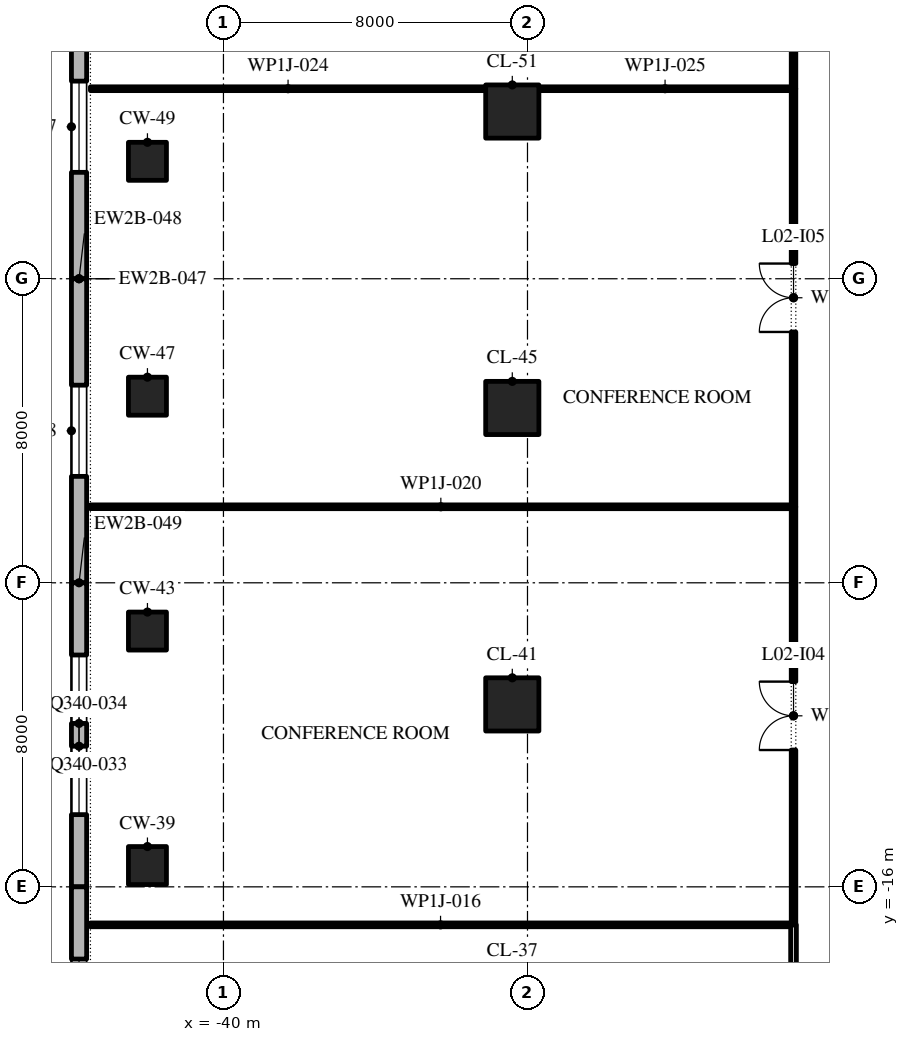
"""IFC4 building model, lengths in metres.
Left out: names, types, materials, properties, quantities, classifications, styles, units other than length and angle.
Written with IfcOpenShell. Run it as: python <this file> out.ifc"""

import sys

from ifc_helpers import new_model, si_unit, direction, frame, frame_2d, origin, origin_2d, place, context, subcontext, project, spatial, polyline, rectangle, outline, extrude, element, fill, save


model = new_model("IFC4")
c1 = context("Model", 3, precision=1e-05, world=origin(), true_north=direction((0.0, 1.0)))
c2 = subcontext(c1, "Body", "Model", "MODEL_VIEW")
j1 = project(units=[si_unit("LENGTHUNIT", "METRE"), si_unit("PLANEANGLEUNIT", "RADIAN")], contexts=[c1])
p1 = place(None, origin())
s1 = spatial("IfcSite", under=j1, at=p1, CompositionType="ELEMENT")
p2 = place(p1, origin())
s2 = spatial("IfcBuilding", under=s1, at=p2, CompositionType="ELEMENT")
p3 = place(p2, frame((0.0, 0.0, 14.0)))
s3 = spatial("IfcBuildingStorey", under=s2, at=p3, CompositionType="ELEMENT", Elevation=14.0)
p4 = place(p3, frame((-42.0, -15.44, 0.0), z_axis=(0.0, 0.0, 1.0), x_axis=(1.0, 0.0, 0.0)))
e1 = element("IfcColumn", 1, at=p4, inside=s3, PredefinedType="COLUMN", context=c2, shape_type="SweptSolid", body=[
    extrude(rectangle(XDim=1.0, YDim=1.0, at=origin_2d()), origin(), (0.0, 0.0, 1.0), 5.2),
])
p5 = place(p3, frame((-32.4, -11.2, 0.0), z_axis=(0.0, 0.0, 1.0), x_axis=(1.0, 0.0, 0.0)))
e2 = element("IfcColumn", 2, at=p5, inside=s3, PredefinedType="COLUMN", context=c2, shape_type="SweptSolid", body=[
    extrude(rectangle(XDim=1.4, YDim=1.4, at=origin_2d()), origin(), (0.0, 0.0, 1.0), 5.2),
])
p6 = place(p3, frame((-42.0, -9.27, 0.0), z_axis=(0.0, 0.0, 1.0), x_axis=(1.0, 0.0, 0.0)))
e3 = element("IfcColumn", 3, at=p6, inside=s3, PredefinedType="COLUMN", context=c2, shape_type="SweptSolid", body=[
    extrude(rectangle(XDim=1.0, YDim=1.0, at=origin_2d()), origin(), (0.0, 0.0, 1.0), 5.2),
])
p7 = place(p3, frame((-32.4, -3.4, 0.0), z_axis=(0.0, 0.0, 1.0), x_axis=(1.0, 0.0, 0.0)))
e4 = element("IfcColumn", 4, at=p7, inside=s3, PredefinedType="COLUMN", context=c2, shape_type="SweptSolid", body=[
    extrude(rectangle(XDim=1.4, YDim=1.4, at=origin_2d()), origin(), (0.0, 0.0, 1.0), 5.2),
])
for number, where, z_axis, x_axis in (
    (5, (-42.0, -3.09, 0.0), (0.0, 0.0, 1.0), (1.0, 0.0, 0.0)),
    (6, (-42.0, 3.09, 0.0), (0.0, 0.0, 1.0), (1.0, 0.0, 0.0)),
):
    element("IfcColumn", number, at=place(p3, frame(where, z_axis=z_axis, x_axis=x_axis)), inside=s3, PredefinedType="COLUMN", context=c2, shape_type="SweptSolid", body=[
        extrude(rectangle(XDim=1.0, YDim=1.0, at=origin_2d()), origin(), (0.0, 0.0, 1.0), 5.2),
    ])
p8 = place(p3, frame((-32.4, 4.4, 0.0), z_axis=(0.0, 0.0, 1.0), x_axis=(1.0, 0.0, 0.0)))
e7 = element("IfcColumn", 7, at=p8, inside=s3, PredefinedType="COLUMN", context=c2, shape_type="SweptSolid", body=[
    extrude(rectangle(XDim=1.4, YDim=1.4, at=origin_2d()), origin(), (0.0, 0.0, 1.0), 5.2),
])
p9 = place(p3, frame((-43.8, 8.0, 0.0), z_axis=(0.0, 0.0, 1.0), x_axis=(0.0, -1.0, 0.0)))
e8 = element("IfcWall", 8, at=p9, inside=s3, PredefinedType="STANDARD", context=c2, shape_type="SweptSolid", body=[
    extrude(rectangle(XDim=8.0, YDim=0.4, at=frame_2d((4.0, 0.0))), origin(), (0.0, 0.0, 1.0), 4.9),
])
p10 = place(p9, frame((2.8, 0.0, 0.9)))
e9 = element("IfcOpeningElement", 9, at=p10, cuts=e8, PredefinedType="OPENING", context=c2, shape_type="SweptSolid", body=[
    extrude(outline(polyline([(0.0, 0.0), (2.4, 0.0), (2.4, 1.7), (2.379, 1.976), (2.315, 2.246), (2.212, 2.502), (2.07, 2.74), (1.893, 2.954), (1.686, 3.137), (1.453, 3.287), (1.2, 3.4), (0.947, 3.287), (0.714, 3.137), (0.507, 2.954), (0.33, 2.74), (0.188, 2.502), (0.084, 2.246), (0.021, 1.976), (0.0, 1.7), (0.0, 0.0)])), frame((0.0, 0.21, 0.0), z_axis=(0.0, -1.0, 0.0), x_axis=(1.0, 0.0, 0.0)), (0.0, 0.0, 1.0), 0.42),
])
p11 = place(p3, frame((-43.8, 0.0, 0.0), z_axis=(0.0, 0.0, 1.0), x_axis=(0.0, -1.0, 0.0)))
e10 = element("IfcWall", 10, at=p11, inside=s3, PredefinedType="STANDARD", context=c2, shape_type="SweptSolid", body=[
    extrude(rectangle(XDim=8.0, YDim=0.4, at=frame_2d((4.0, 0.0))), origin(), (0.0, 0.0, 1.0), 4.9),
])
p12 = place(p11, frame((2.8, 0.0, 0.9)))
e11 = element("IfcOpeningElement", 11, at=p12, cuts=e10, PredefinedType="OPENING", context=c2, shape_type="SweptSolid", body=[
    extrude(outline(polyline([(0.0, 0.0), (2.4, 0.0), (2.4, 1.7), (2.379, 1.976), (2.315, 2.246), (2.212, 2.502), (2.07, 2.74), (1.893, 2.954), (1.686, 3.137), (1.453, 3.287), (1.2, 3.4), (0.947, 3.287), (0.714, 3.137), (0.507, 2.954), (0.33, 2.74), (0.188, 2.502), (0.084, 2.246), (0.021, 1.976), (0.0, 1.7), (0.0, 0.0)])), frame((0.0, 0.21, 0.0), z_axis=(0.0, -1.0, 0.0), x_axis=(1.0, 0.0, 0.0)), (0.0, 0.0, 1.0), 0.42),
])
p13 = place(p3, frame((-43.8, -8.0, 0.0), z_axis=(0.0, 0.0, 1.0), x_axis=(0.0, -1.0, 0.0)))
e12 = element("IfcWall", 12, at=p13, inside=s3, PredefinedType="STANDARD", context=c2, shape_type="SweptSolid", body=[
    extrude(rectangle(XDim=8.0, YDim=0.4, at=frame_2d((4.0, 0.0))), origin(), (0.0, 0.0, 1.0), 4.9),
])
p14 = place(p13, frame((1.9, 0.0, 0.9)))
e13 = element("IfcOpeningElement", 13, at=p14, cuts=e12, PredefinedType="OPENING", context=c2, shape_type="SweptSolid", body=[
    extrude(outline(polyline([(0.0, 0.0), (1.8, 0.0), (1.8, 1.841), (1.785, 2.076), (1.739, 2.307), (1.663, 2.53), (1.559, 2.741), (1.428, 2.937), (1.273, 3.114), (1.096, 3.269), (0.9, 3.4), (0.704, 3.269), (0.527, 3.114), (0.372, 2.937), (0.241, 2.741), (0.137, 2.53), (0.061, 2.307), (0.015, 2.076), (0.0, 1.841), (0.0, 0.0)])), frame((0.0, 0.21, 0.0), z_axis=(0.0, -1.0, 0.0), x_axis=(1.0, 0.0, 0.0)), (0.0, 0.0, 1.0), 0.42),
])
p15 = place(p13, frame((4.3, 0.0, 0.9)))
e14 = element("IfcOpeningElement", 14, at=p15, cuts=e12, PredefinedType="OPENING", context=c2, shape_type="SweptSolid", body=[
    extrude(outline(polyline([(0.0, 0.0), (1.8, 0.0), (1.8, 1.841), (1.785, 2.076), (1.739, 2.307), (1.663, 2.53), (1.559, 2.741), (1.428, 2.937), (1.273, 3.114), (1.096, 3.269), (0.9, 3.4), (0.704, 3.269), (0.527, 3.114), (0.372, 2.937), (0.241, 2.741), (0.137, 2.53), (0.061, 2.307), (0.015, 2.076), (0.0, 1.841), (0.0, 0.0)])), frame((0.0, 0.21, 0.0), z_axis=(0.0, -1.0, 0.0), x_axis=(1.0, 0.0, 0.0)), (0.0, 0.0, 1.0), 0.42),
])
p16 = place(p3, frame((-43.8, -16.0, 0.0), z_axis=(0.0, 0.0, 1.0), x_axis=(0.0, -1.0, 0.0)))
e15 = element("IfcWall", 15, at=p16, inside=s3, PredefinedType="STANDARD", context=c2, shape_type="SweptSolid", body=[
    extrude(rectangle(XDim=8.0, YDim=0.4, at=frame_2d((4.0, 0.0))), origin(), (0.0, 0.0, 1.0), 4.9),
])
p17 = place(p16, frame((1.9, 0.0, 0.9)))
e16 = element("IfcOpeningElement", 16, at=p17, cuts=e15, PredefinedType="OPENING", context=c2, shape_type="SweptSolid", body=[
    extrude(outline(polyline([(0.0, 0.0), (1.8, 0.0), (1.8, 1.841), (1.785, 2.076), (1.739, 2.307), (1.663, 2.53), (1.559, 2.741), (1.428, 2.937), (1.273, 3.114), (1.096, 3.269), (0.9, 3.4), (0.704, 3.269), (0.527, 3.114), (0.372, 2.937), (0.241, 2.741), (0.137, 2.53), (0.061, 2.307), (0.015, 2.076), (0.0, 1.841), (0.0, 0.0)])), frame((0.0, 0.21, 0.0), z_axis=(0.0, -1.0, 0.0), x_axis=(1.0, 0.0, 0.0)), (0.0, 0.0, 1.0), 0.42),
])
p18 = place(p16, frame((4.3, 0.0, 0.9)))
e17 = element("IfcOpeningElement", 17, at=p18, cuts=e15, PredefinedType="OPENING", context=c2, shape_type="SweptSolid", body=[
    extrude(outline(polyline([(0.0, 0.0), (1.8, 0.0), (1.8, 1.841), (1.785, 2.076), (1.739, 2.307), (1.663, 2.53), (1.559, 2.741), (1.428, 2.937), (1.273, 3.114), (1.096, 3.269), (0.9, 3.4), (0.704, 3.269), (0.527, 3.114), (0.372, 2.937), (0.241, 2.741), (0.137, 2.53), (0.061, 2.307), (0.015, 2.076), (0.0, 1.841), (0.0, 0.0)])), frame((0.0, 0.21, 0.0), z_axis=(0.0, -1.0, 0.0), x_axis=(1.0, 0.0, 0.0)), (0.0, 0.0, 1.0), 0.42),
])
p19 = place(p3, frame((-43.5, -17.0, 0.0), z_axis=(0.0, 0.0, 1.0), x_axis=(1.0, 0.0, 0.0)))
e18 = element("IfcWall", 18, at=p19, inside=s3, PredefinedType="PARTITIONING", context=c2, shape_type="SweptSolid", body=[
    extrude(rectangle(XDim=18.425, YDim=0.1, at=frame_2d((9.212, 0.0))), origin(), (0.0, 0.0, 1.0), 4.9),
])
p20 = place(p3, frame((-43.5, -6.0, 0.0), z_axis=(0.0, 0.0, 1.0), x_axis=(1.0, 0.0, 0.0)))
e19 = element("IfcWall", 19, at=p20, inside=s3, PredefinedType="PARTITIONING", context=c2, shape_type="SweptSolid", body=[
    extrude(rectangle(XDim=18.44, YDim=0.1, at=frame_2d((9.22, 0.0))), origin(), (0.0, 0.0, 1.0), 4.9),
])
p21 = place(p3, frame((-43.5, 5.0, 0.0), z_axis=(0.0, 0.0, 1.0), x_axis=(1.0, 0.0, 0.0)))
e20 = element("IfcWall", 20, at=p21, inside=s3, PredefinedType="PARTITIONING", context=c2, shape_type="SweptSolid", body=[
    extrude(rectangle(XDim=10.4, YDim=0.1, at=frame_2d((5.2, 0.0))), origin(), (0.0, 0.0, 1.0), 4.9),
])
p22 = place(p3, frame((-31.7, 5.0, 0.0), z_axis=(0.0, 0.0, 1.0), x_axis=(1.0, 0.0, 0.0)))
e21 = element("IfcWall", 21, at=p22, inside=s3, PredefinedType="PARTITIONING", context=c2, shape_type="SweptSolid", body=[
    extrude(rectangle(XDim=6.64, YDim=0.1, at=frame_2d((3.32, 0.0))), origin(), (0.0, 0.0, 1.0), 4.9),
])
p23 = place(p3, frame((-25.0, -28.575, 0.0), z_axis=(0.0, 0.0, 1.0), x_axis=(0.0, 1.0, 0.0)))
e22 = element("IfcWall", 22, at=p23, inside=s3, PredefinedType="PARTITIONING", context=c2, shape_type="SweptSolid", body=[
    extrude(rectangle(XDim=11.575, YDim=0.15, at=frame_2d((5.788, 0.0))), origin(), (0.0, 0.0, 1.0), 4.9),
])
p24 = place(p23, frame((4.887, 0.0, 0.0)))
e23 = element("IfcOpeningElement", 23, at=p24, cuts=e22, PredefinedType="OPENING", context=c2, shape_type="SweptSolid", body=[
    extrude(rectangle(XDim=1.8, YDim=2.1, at=frame_2d((0.9, 1.05))), frame((0.0, 0.085, 0.0), z_axis=(0.0, -1.0, 0.0), x_axis=(1.0, 0.0, 0.0)), (0.0, 0.0, 1.0), 0.17),
])
p25 = place(p3, frame((-25.0, -17.0, 0.0), z_axis=(0.0, 0.0, 1.0), x_axis=(0.0, 1.0, 0.0)))
e24 = element("IfcWall", 24, at=p25, inside=s3, PredefinedType="PARTITIONING", context=c2, shape_type="SweptSolid", body=[
    extrude(rectangle(XDim=11.0, YDim=0.12, at=frame_2d((5.5, 0.0))), origin(), (0.0, 0.0, 1.0), 4.9),
])
p26 = place(p25, frame((4.6, 0.0, 0.0)))
e25 = element("IfcOpeningElement", 25, at=p26, cuts=e24, PredefinedType="OPENING", context=c2, shape_type="SweptSolid", body=[
    extrude(rectangle(XDim=1.8, YDim=2.1, at=frame_2d((0.9, 1.05))), frame((0.0, 0.07, 0.0), z_axis=(0.0, -1.0, 0.0), x_axis=(1.0, 0.0, 0.0)), (0.0, 0.0, 1.0), 0.14),
])
p27 = place(p3, frame((-25.0, -6.0, 0.0), z_axis=(0.0, 0.0, 1.0), x_axis=(0.0, 1.0, 0.0)))
e26 = element("IfcWall", 26, at=p27, inside=s3, PredefinedType="PARTITIONING", context=c2, shape_type="SweptSolid", body=[
    extrude(rectangle(XDim=11.0, YDim=0.12, at=frame_2d((5.5, 0.0))), origin(), (0.0, 0.0, 1.0), 4.9),
])
p28 = place(p27, frame((4.6, 0.0, 0.0)))
e27 = element("IfcOpeningElement", 27, at=p28, cuts=e26, PredefinedType="OPENING", context=c2, shape_type="SweptSolid", body=[
    extrude(rectangle(XDim=1.8, YDim=2.1, at=frame_2d((0.9, 1.05))), frame((0.0, 0.07, 0.0), z_axis=(0.0, -1.0, 0.0), x_axis=(1.0, 0.0, 0.0)), (0.0, 0.0, 1.0), 0.14),
])
p29 = place(p3, frame((-25.0, 5.0, 0.0), z_axis=(0.0, 0.0, 1.0), x_axis=(0.0, 1.0, 0.0)))
e28 = element("IfcWall", 28, at=p29, inside=s3, PredefinedType="PARTITIONING", context=c2, shape_type="SweptSolid", body=[
    extrude(rectangle(XDim=9.0, YDim=0.12, at=frame_2d((4.5, 0.0))), origin(), (0.0, 0.0, 1.0), 4.9),
])
p30 = place(p29, frame((3.6, 0.0, 0.0)))
e29 = element("IfcOpeningElement", 29, at=p30, cuts=e28, PredefinedType="OPENING", context=c2, shape_type="SweptSolid", body=[
    extrude(rectangle(XDim=1.8, YDim=2.1, at=frame_2d((0.9, 1.05))), frame((0.0, 0.07, 0.0), z_axis=(0.0, -1.0, 0.0), x_axis=(1.0, 0.0, 0.0)), (0.0, 0.0, 1.0), 0.14),
])
p31 = place(p10, origin())
e30 = element("IfcWindow", 30, at=p31, inside=s3, PartitioningType="DOUBLE_PANEL_VERTICAL", PredefinedType="WINDOW", context=c2, shape_type="SweptSolid", body=[
    extrude(outline(polyline([(0.0, 0.0), (2.4, 0.0), (2.4, 1.7), (2.379, 1.976), (2.315, 2.246), (2.212, 2.502), (2.07, 2.74), (1.893, 2.954), (1.686, 3.137), (1.453, 3.287), (1.2, 3.4), (0.947, 3.287), (0.714, 3.137), (0.507, 2.954), (0.33, 2.74), (0.188, 2.502), (0.084, 2.246), (0.021, 1.976), (0.0, 1.7), (0.0, 0.0)])), frame((0.0, 0.03, 0.0), z_axis=(0.0, -1.0, 0.0), x_axis=(1.0, 0.0, 0.0)), (0.0, 0.0, 1.0), 0.06),
])
fill(e9, e30)
p32 = place(p12, origin())
e31 = element("IfcWindow", 31, at=p32, inside=s3, PartitioningType="DOUBLE_PANEL_VERTICAL", PredefinedType="WINDOW", context=c2, shape_type="SweptSolid", body=[
    extrude(outline(polyline([(0.0, 0.0), (2.4, 0.0), (2.4, 1.7), (2.379, 1.976), (2.315, 2.246), (2.212, 2.502), (2.07, 2.74), (1.893, 2.954), (1.686, 3.137), (1.453, 3.287), (1.2, 3.4), (0.947, 3.287), (0.714, 3.137), (0.507, 2.954), (0.33, 2.74), (0.188, 2.502), (0.084, 2.246), (0.021, 1.976), (0.0, 1.7), (0.0, 0.0)])), frame((0.0, 0.03, 0.0), z_axis=(0.0, -1.0, 0.0), x_axis=(1.0, 0.0, 0.0)), (0.0, 0.0, 1.0), 0.06),
])
fill(e11, e31)
p33 = place(p14, origin())
e32 = element("IfcWindow", 32, at=p33, inside=s3, PartitioningType="DOUBLE_PANEL_VERTICAL", PredefinedType="WINDOW", context=c2, shape_type="SweptSolid", body=[
    extrude(outline(polyline([(0.0, 0.0), (1.8, 0.0), (1.8, 1.841), (1.785, 2.076), (1.739, 2.307), (1.663, 2.53), (1.559, 2.741), (1.428, 2.937), (1.273, 3.114), (1.096, 3.269), (0.9, 3.4), (0.704, 3.269), (0.527, 3.114), (0.372, 2.937), (0.241, 2.741), (0.137, 2.53), (0.061, 2.307), (0.015, 2.076), (0.0, 1.841), (0.0, 0.0)])), frame((0.0, 0.03, 0.0), z_axis=(0.0, -1.0, 0.0), x_axis=(1.0, 0.0, 0.0)), (0.0, 0.0, 1.0), 0.06),
])
fill(e13, e32)
p34 = place(p15, origin())
e33 = element("IfcWindow", 33, at=p34, inside=s3, PartitioningType="DOUBLE_PANEL_VERTICAL", PredefinedType="WINDOW", context=c2, shape_type="SweptSolid", body=[
    extrude(outline(polyline([(0.0, 0.0), (1.8, 0.0), (1.8, 1.841), (1.785, 2.076), (1.739, 2.307), (1.663, 2.53), (1.559, 2.741), (1.428, 2.937), (1.273, 3.114), (1.096, 3.269), (0.9, 3.4), (0.704, 3.269), (0.527, 3.114), (0.372, 2.937), (0.241, 2.741), (0.137, 2.53), (0.061, 2.307), (0.015, 2.076), (0.0, 1.841), (0.0, 0.0)])), frame((0.0, 0.03, 0.0), z_axis=(0.0, -1.0, 0.0), x_axis=(1.0, 0.0, 0.0)), (0.0, 0.0, 1.0), 0.06),
])
fill(e14, e33)
p35 = place(p17, origin())
e34 = element("IfcWindow", 34, at=p35, inside=s3, PartitioningType="DOUBLE_PANEL_VERTICAL", PredefinedType="WINDOW", context=c2, shape_type="SweptSolid", body=[
    extrude(outline(polyline([(0.0, 0.0), (1.8, 0.0), (1.8, 1.841), (1.785, 2.076), (1.739, 2.307), (1.663, 2.53), (1.559, 2.741), (1.428, 2.937), (1.273, 3.114), (1.096, 3.269), (0.9, 3.4), (0.704, 3.269), (0.527, 3.114), (0.372, 2.937), (0.241, 2.741), (0.137, 2.53), (0.061, 2.307), (0.015, 2.076), (0.0, 1.841), (0.0, 0.0)])), frame((0.0, 0.03, 0.0), z_axis=(0.0, -1.0, 0.0), x_axis=(1.0, 0.0, 0.0)), (0.0, 0.0, 1.0), 0.06),
])
fill(e16, e34)
p36 = place(p26, origin())
e35 = element("IfcDoor", 35, at=p36, inside=s3, OperationType="SINGLE_SWING_RIGHT", PredefinedType="DOOR", context=c2, shape_type="SweptSolid", body=[
    extrude(rectangle(XDim=1.8, YDim=2.1, at=frame_2d((0.9, 1.05))), frame((0.0, 0.025, 0.0), z_axis=(0.0, -1.0, 0.0), x_axis=(1.0, 0.0, 0.0)), (0.0, 0.0, 1.0), 0.05),
])
fill(e25, e35)
p37 = place(p28, origin())
e36 = element("IfcDoor", 36, at=p37, inside=s3, OperationType="SINGLE_SWING_RIGHT", PredefinedType="DOOR", context=c2, shape_type="SweptSolid", body=[
    extrude(rectangle(XDim=1.8, YDim=2.1, at=frame_2d((0.9, 1.05))), frame((0.0, 0.025, 0.0), z_axis=(0.0, -1.0, 0.0), x_axis=(1.0, 0.0, 0.0)), (0.0, 0.0, 1.0), 0.05),
])
fill(e27, e36)
save(model, sys.argv[1])
